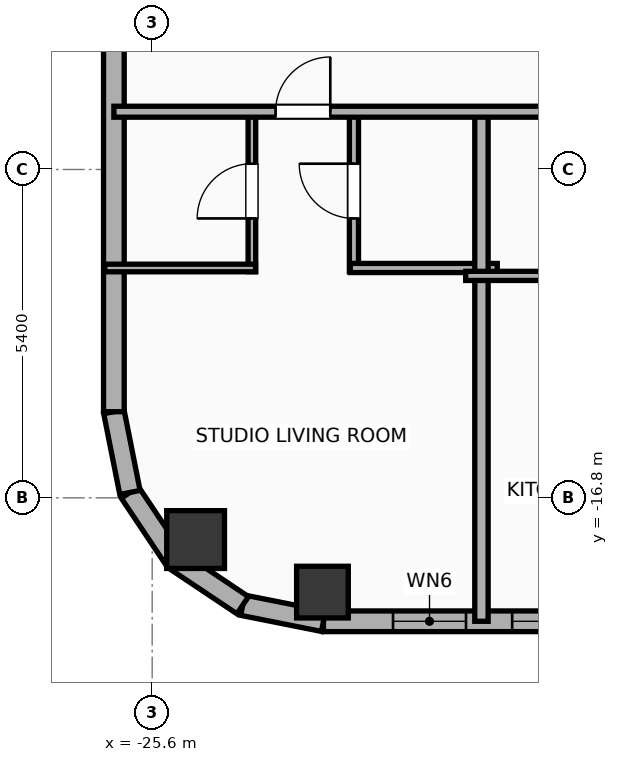
"""IFC4 building model, lengths in metres.
Left out: names, types, materials, properties, quantities, classifications, styles, units other than length and angle.
Written with IfcOpenShell. Run it as: python <this file> out.ifc"""

import sys

from ifc_helpers import new_model, si_unit, direction, frame, frame_2d, origin, origin_2d, place, context, subcontext, project, spatial, rectangle, hollow_rectangle, hollow_circle, extrude, element, fill, save


model = new_model("IFC4")
c1 = context("Model", 3, precision=1e-05, world=origin(), true_north=direction((0.0, 1.0)))
c2 = subcontext(c1, "Body", "Model", "MODEL_VIEW")
j1 = project(units=[si_unit("LENGTHUNIT", "METRE"), si_unit("PLANEANGLEUNIT", "RADIAN")], contexts=[c1])
p1 = place(None, origin())
s1 = spatial("IfcSite", under=j1, at=p1, CompositionType="ELEMENT")
p2 = place(p1, origin())
s2 = spatial("IfcBuilding", under=s1, at=p2, CompositionType="ELEMENT")
p3 = place(p2, frame((0.0, 0.0, 239.2)))
s3 = spatial("IfcBuildingStorey", under=s2, at=p3, CompositionType="ELEMENT", Elevation=239.2)
p4 = place(p3, frame((-22.8, -18.35, 0.0), z_axis=(0.0, 0.0, 1.0), x_axis=(1.0, 0.0, 0.0)))
e1 = element("IfcColumn", 1, at=p4, inside=s3, PredefinedType="COLUMN", context=c2, shape_type="SweptSolid", body=[
    extrude(hollow_rectangle(XDim=0.85, YDim=0.85, WallThickness=0.028, at=origin_2d()), origin(), (0.0, 0.0, 1.0), 3.9),
])
p5 = place(p3, frame((-24.886, -17.486, 0.0), z_axis=(0.0, 0.0, 1.0), x_axis=(1.0, 0.0, 0.0)))
e2 = element("IfcColumn", 2, at=p5, inside=s3, PredefinedType="COLUMN", context=c2, shape_type="SweptSolid", body=[
    extrude(hollow_circle(Radius=0.475, WallThickness=0.032, at=origin_2d()), origin(), (0.0, 0.0, 1.0), 3.9),
])
p6 = place(p3, frame((26.783, -18.83, 0.0), z_axis=(0.0, 0.0, 1.0), x_axis=(-1.0, 0.0, 0.0)))
e3 = element("IfcWall", 3, at=p6, inside=s3, PredefinedType="ELEMENTEDWALL", context=c2, shape_type="SweptSolid", body=[
    extrude(rectangle(XDim=49.566, YDim=0.34, at=frame_2d((24.783, 0.0))), origin(), (0.0, 0.0, 1.0), 3.65),
])
p7 = place(p6, frame((23.583, 0.0, 0.75)))
e4 = element("IfcOpeningElement", 4, at=p7, cuts=e3, PredefinedType="OPENING", context=c2, shape_type="SweptSolid", body=[
    extrude(rectangle(XDim=2.4, YDim=2.1, at=frame_2d((1.2, 1.05))), frame((0.0, 0.18, 0.0), z_axis=(0.0, -1.0, 0.0), x_axis=(1.0, 0.0, 0.0)), (0.0, 0.0, 1.0), 0.36),
])
p8 = place(p6, frame((41.756, 0.0, 0.75)))
e5 = element("IfcOpeningElement", 5, at=p8, cuts=e3, PredefinedType="OPENING", context=c2, shape_type="SweptSolid", body=[
    extrude(rectangle(XDim=2.4, YDim=2.1, at=frame_2d((1.2, 1.05))), frame((0.0, 0.18, 0.0), z_axis=(0.0, -1.0, 0.0), x_axis=(1.0, 0.0, 0.0)), (0.0, 0.0, 1.0), 0.36),
])
p9 = place(p6, frame((47.222, 0.0, 0.75)))
e6 = element("IfcOpeningElement", 6, at=p9, cuts=e3, PredefinedType="OPENING", context=c2, shape_type="SweptSolid", body=[
    extrude(rectangle(XDim=1.2, YDim=2.05, at=frame_2d((0.6, 1.025))), frame((0.0, 0.18, 0.0), z_axis=(0.0, -1.0, 0.0), x_axis=(1.0, 0.0, 0.0)), (0.0, 0.0, 1.0), 0.36),
])
p10 = place(p6, frame((45.263, 0.0, 0.75)))
e7 = element("IfcOpeningElement", 7, at=p10, cuts=e3, PredefinedType="OPENING", context=c2, shape_type="SweptSolid", body=[
    extrude(rectangle(XDim=1.2, YDim=2.05, at=frame_2d((0.6, 1.025))), frame((0.0, 0.18, 0.0), z_axis=(0.0, -1.0, 0.0), x_axis=(1.0, 0.0, 0.0)), (0.0, 0.0, 1.0), 0.36),
])
p11 = place(p6, frame((37.289, 0.0, 0.75)))
e8 = element("IfcOpeningElement", 8, at=p11, cuts=e3, PredefinedType="OPENING", context=c2, shape_type="SweptSolid", body=[
    extrude(rectangle(XDim=1.2, YDim=2.05, at=frame_2d((0.6, 1.025))), frame((0.0, 0.18, 0.0), z_axis=(0.0, -1.0, 0.0), x_axis=(1.0, 0.0, 0.0)), (0.0, 0.0, 1.0), 0.36),
])
p12 = place(p6, frame((16.115, 0.0, 0.75)))
e9 = element("IfcOpeningElement", 9, at=p12, cuts=e3, PredefinedType="OPENING", context=c2, shape_type="SweptSolid", body=[
    extrude(rectangle(XDim=1.2, YDim=2.05, at=frame_2d((0.6, 1.025))), frame((0.0, 0.18, 0.0), z_axis=(0.0, -1.0, 0.0), x_axis=(1.0, 0.0, 0.0)), (0.0, 0.0, 1.0), 0.36),
])
p13 = place(p6, frame((12.422, 0.0, 0.75)))
e10 = element("IfcOpeningElement", 10, at=p13, cuts=e3, PredefinedType="OPENING", context=c2, shape_type="SweptSolid", body=[
    extrude(rectangle(XDim=1.2, YDim=2.05, at=frame_2d((0.6, 1.025))), frame((0.0, 0.18, 0.0), z_axis=(0.0, -1.0, 0.0), x_axis=(1.0, 0.0, 0.0)), (0.0, 0.0, 1.0), 0.36),
])
p14 = place(p6, frame((8.01, 0.0, 0.75)))
e11 = element("IfcOpeningElement", 11, at=p14, cuts=e3, PredefinedType="OPENING", context=c2, shape_type="SweptSolid", body=[
    extrude(rectangle(XDim=1.2, YDim=2.05, at=frame_2d((0.6, 1.025))), frame((0.0, 0.18, 0.0), z_axis=(0.0, -1.0, 0.0), x_axis=(1.0, 0.0, 0.0)), (0.0, 0.0, 1.0), 0.36),
])
p15 = place(p6, frame((5.037, 0.0, 0.75)))
e12 = element("IfcOpeningElement", 12, at=p15, cuts=e3, PredefinedType="OPENING", context=c2, shape_type="SweptSolid", body=[
    extrude(rectangle(XDim=1.2, YDim=2.05, at=frame_2d((0.6, 1.025))), frame((0.0, 0.18, 0.0), z_axis=(0.0, -1.0, 0.0), x_axis=(1.0, 0.0, 0.0)), (0.0, 0.0, 1.0), 0.36),
])
p16 = place(p6, frame((1.811, 0.0, 0.75)))
e13 = element("IfcOpeningElement", 13, at=p16, cuts=e3, PredefinedType="OPENING", context=c2, shape_type="SweptSolid", body=[
    extrude(rectangle(XDim=1.2, YDim=2.05, at=frame_2d((0.6, 1.025))), frame((0.0, 0.18, 0.0), z_axis=(0.0, -1.0, 0.0), x_axis=(1.0, 0.0, 0.0)), (0.0, 0.0, 1.0), 0.36),
])
p17 = place(p6, frame((32.253, 0.0, 0.75)))
e14 = element("IfcOpeningElement", 14, at=p17, cuts=e3, PredefinedType="OPENING", context=c2, shape_type="SweptSolid", body=[
    extrude(rectangle(XDim=1.2, YDim=2.05, at=frame_2d((0.6, 1.025))), frame((0.0, 0.18, 0.0), z_axis=(0.0, -1.0, 0.0), x_axis=(1.0, 0.0, 0.0)), (0.0, 0.0, 1.0), 0.36),
])
p18 = place(p6, frame((27.853, 0.0, 0.75)))
e15 = element("IfcOpeningElement", 15, at=p18, cuts=e3, PredefinedType="OPENING", context=c2, shape_type="SweptSolid", body=[
    extrude(rectangle(XDim=1.2, YDim=2.05, at=frame_2d((0.6, 1.025))), frame((0.0, 0.18, 0.0), z_axis=(0.0, -1.0, 0.0), x_axis=(1.0, 0.0, 0.0)), (0.0, 0.0, 1.0), 0.36),
])
p19 = place(p6, frame((20.473, 0.0, 0.75)))
e16 = element("IfcOpeningElement", 16, at=p19, cuts=e3, PredefinedType="OPENING", context=c2, shape_type="SweptSolid", body=[
    extrude(rectangle(XDim=1.2, YDim=2.05, at=frame_2d((0.6, 1.025))), frame((0.0, 0.18, 0.0), z_axis=(0.0, -1.0, 0.0), x_axis=(1.0, 0.0, 0.0)), (0.0, 0.0, 1.0), 0.36),
])
p20 = place(p3, frame((-22.783, -18.83, 0.0), z_axis=(0.0, 0.0, 1.0), x_axis=(-0.980788153188, 0.195075878998, 0.0)))
e17 = element("IfcWall", 17, at=p20, inside=s3, PredefinedType="ELEMENTEDWALL", context=c2, shape_type="SweptSolid", body=[
    extrude(rectangle(XDim=1.354, YDim=0.34, at=frame_2d((0.677, 0.0))), origin(), (0.0, 0.0, 1.0), 3.65),
])
p21 = place(p3, frame((-24.111, -18.566, 0.0), z_axis=(0.0, 0.0, 1.0), x_axis=(-0.831403586725, 0.555669034571, 0.0)))
e18 = element("IfcWall", 18, at=p21, inside=s3, PredefinedType="ELEMENTEDWALL", context=c2, shape_type="SweptSolid", body=[
    extrude(rectangle(XDim=1.337, YDim=0.34, at=frame_2d((0.668, 0.0))), origin(), (0.0, 0.0, 1.0), 3.65),
])
p22 = place(p3, frame((-25.223, -17.823, 0.0), z_axis=(0.0, 0.0, 1.0), x_axis=(-0.555584683399, 0.831459956686, 0.0)))
e19 = element("IfcWall", 19, at=p22, inside=s3, PredefinedType="ELEMENTEDWALL", context=c2, shape_type="SweptSolid", body=[
    extrude(rectangle(XDim=1.337, YDim=0.34, at=frame_2d((0.668, 0.0))), origin(), (0.0, 0.0, 1.0), 3.65),
])
p23 = place(p3, frame((-25.966, -16.711, 0.0), z_axis=(0.0, 0.0, 1.0), x_axis=(-0.195110379894, 0.98078129043, 0.0)))
e20 = element("IfcWall", 20, at=p23, inside=s3, PredefinedType="ELEMENTEDWALL", context=c2, shape_type="SweptSolid", body=[
    extrude(rectangle(XDim=1.354, YDim=0.34, at=frame_2d((0.677, 0.0))), origin(), (0.0, 0.0, 1.0), 3.65),
])
p24 = place(p3, frame((-26.23, -15.383, 0.0), z_axis=(0.0, 0.0, 1.0), x_axis=(0.0, 1.0, 0.0)))
e21 = element("IfcWall", 21, at=p24, inside=s3, PredefinedType="ELEMENTEDWALL", context=c2, shape_type="SweptSolid", body=[
    extrude(rectangle(XDim=31.967, YDim=0.34, at=frame_2d((15.983, 0.0))), origin(), (0.0, 0.0, 1.0), 3.65),
])
p25 = place(p24, frame((29.431, 0.0, 0.75)))
e22 = element("IfcOpeningElement", 22, at=p25, cuts=e21, PredefinedType="OPENING", context=c2, shape_type="SweptSolid", body=[
    extrude(rectangle(XDim=1.2, YDim=2.05, at=frame_2d((0.6, 1.025))), frame((0.0, 0.18, 0.0), z_axis=(0.0, -1.0, 0.0), x_axis=(1.0, 0.0, 0.0)), (0.0, 0.0, 1.0), 0.36),
])
p26 = place(p24, frame((20.603, 0.0, 0.75)))
e23 = element("IfcOpeningElement", 23, at=p26, cuts=e21, PredefinedType="OPENING", context=c2, shape_type="SweptSolid", body=[
    extrude(rectangle(XDim=1.2, YDim=2.05, at=frame_2d((0.6, 1.025))), frame((0.0, 0.18, 0.0), z_axis=(0.0, -1.0, 0.0), x_axis=(1.0, 0.0, 0.0)), (0.0, 0.0, 1.0), 0.36),
])
p27 = place(p24, frame((9.778, 0.0, 0.75)))
e24 = element("IfcOpeningElement", 24, at=p27, cuts=e21, PredefinedType="OPENING", context=c2, shape_type="SweptSolid", body=[
    extrude(rectangle(XDim=1.2, YDim=2.05, at=frame_2d((0.6, 1.025))), frame((0.0, 0.18, 0.0), z_axis=(0.0, -1.0, 0.0), x_axis=(1.0, 0.0, 0.0)), (0.0, 0.0, 1.0), 0.36),
])
p28 = place(p3, frame((-23.96, -13.08, 0.0), z_axis=(0.0, 0.0, 1.0), x_axis=(0.0, 1.0, 0.0)))
e25 = element("IfcWall", 25, at=p28, inside=s3, PredefinedType="PARTITIONING", context=c2, shape_type="SweptSolid", body=[
    extrude(rectangle(XDim=2.65, YDim=0.125, at=frame_2d((1.325, 0.0))), origin(), (0.0, 0.0, 1.0), 3.65),
])
p29 = place(p28, frame((0.875, 0.0, 0.0)))
e26 = element("IfcOpeningElement", 26, at=p29, cuts=e25, PredefinedType="OPENING", context=c2, shape_type="SweptSolid", body=[
    extrude(rectangle(XDim=0.9, YDim=2.05, at=frame_2d((0.45, 1.025))), frame((0.0, 0.073, 0.0), z_axis=(0.0, -1.0, 0.0), x_axis=(1.0, 0.0, 0.0)), (0.0, 0.0, 1.0), 0.145),
])
p30 = place(p3, frame((-22.282, -13.08, 0.0), z_axis=(0.0, 0.0, 1.0), x_axis=(0.0, 1.0, 0.0)))
e27 = element("IfcWall", 27, at=p30, inside=s3, PredefinedType="PLUMBINGWALL", context=c2, shape_type="SweptSolid", body=[
    extrude(rectangle(XDim=2.65, YDim=0.15, at=frame_2d((1.325, 0.0))), origin(), (0.0, 0.0, 1.0), 3.65),
])
p31 = place(p30, frame((0.875, 0.0, 0.0)))
e28 = element("IfcOpeningElement", 28, at=p31, cuts=e27, PredefinedType="OPENING", context=c2, shape_type="SweptSolid", body=[
    extrude(rectangle(XDim=0.9, YDim=2.05, at=frame_2d((0.45, 1.025))), frame((0.0, 0.085, 0.0), z_axis=(0.0, -1.0, 0.0), x_axis=(1.0, 0.0, 0.0)), (0.0, 0.0, 1.0), 0.17),
])
p32 = place(p3, frame((-26.38, -13.02, 0.0), z_axis=(0.0, 0.0, 1.0), x_axis=(1.0, 0.0, 0.0)))
e29 = element("IfcWall", 29, at=p32, inside=s3, PredefinedType="PARTITIONING", context=c2, shape_type="SweptSolid", body=[
    extrude(rectangle(XDim=2.48, YDim=0.125, at=frame_2d((1.24, 0.0))), origin(), (0.0, 0.0, 1.0), 3.65),
])
p33 = place(p3, frame((-22.342, -13.02, 0.0), z_axis=(0.0, 0.0, 1.0), x_axis=(1.0, 0.0, 0.0)))
e30 = element("IfcWall", 30, at=p33, inside=s3, PredefinedType="PLUMBINGWALL", context=c2, shape_type="SweptSolid", body=[
    extrude(rectangle(XDim=2.417, YDim=0.15, at=frame_2d((1.208, 0.0))), origin(), (0.0, 0.0, 1.0), 3.65),
])
p34 = place(p3, frame((-20.185, -18.83, 0.0), z_axis=(0.0, 0.0, 1.0), x_axis=(0.0, 1.0, 0.0)))
e31 = element("IfcWall", 31, at=p34, inside=s3, PredefinedType="PARTITIONING", context=c2, shape_type="SweptSolid", body=[
    extrude(rectangle(XDim=8.46, YDim=0.22, at=frame_2d((4.23, 0.0))), origin(), (0.0, 0.0, 1.0), 3.09),
])
p35 = place(p3, frame((-20.445, -13.15, 0.0), z_axis=(0.0, 0.0, 1.0), x_axis=(1.0, 0.0, 0.0)))
e32 = element("IfcWall", 32, at=p35, inside=s3, PredefinedType="PLUMBINGWALL", context=c2, shape_type="SweptSolid", body=[
    extrude(rectangle(XDim=2.55, YDim=0.15, at=frame_2d((1.275, 0.0))), origin(), (0.0, 0.0, 1.0), 3.65),
])
p36 = place(p3, frame((-26.23, -10.45, 0.0), z_axis=(0.0, 0.0, 1.0), x_axis=(1.0, 0.0, 0.0)))
e33 = element("IfcWall", 33, at=p36, inside=s3, PredefinedType="PARTITIONING", context=c2, shape_type="SweptSolid", body=[
    extrude(rectangle(XDim=18.15, YDim=0.18, at=frame_2d((9.075, 0.0))), origin(), (0.0, 0.0, 1.0), 3.65),
])
p37 = place(p36, frame((2.659, 0.0, 0.0)))
e34 = element("IfcOpeningElement", 34, at=p37, cuts=e33, PredefinedType="OPENING", context=c2, shape_type="SweptSolid", body=[
    extrude(rectangle(XDim=0.9, YDim=2.05, at=frame_2d((0.45, 1.025))), frame((0.0, 0.1, 0.0), z_axis=(0.0, -1.0, 0.0), x_axis=(1.0, 0.0, 0.0)), (0.0, 0.0, 1.0), 0.2),
])
p38 = place(p36, frame((9.571, 0.0, 0.0)))
e35 = element("IfcOpeningElement", 35, at=p38, cuts=e33, PredefinedType="OPENING", context=c2, shape_type="SweptSolid", body=[
    extrude(rectangle(XDim=1.15, YDim=2.05, at=frame_2d((0.575, 1.025))), frame((0.0, 0.1, 0.0), z_axis=(0.0, -1.0, 0.0), x_axis=(1.0, 0.0, 0.0)), (0.0, 0.0, 1.0), 0.2),
])
p39 = place(p36, frame((14.792, 0.0, 0.0)))
e36 = element("IfcOpeningElement", 36, at=p39, cuts=e33, PredefinedType="OPENING", context=c2, shape_type="SweptSolid", body=[
    extrude(rectangle(XDim=0.9, YDim=2.05, at=frame_2d((0.45, 1.025))), frame((0.0, 0.1, 0.0), z_axis=(0.0, -1.0, 0.0), x_axis=(1.0, 0.0, 0.0)), (0.0, 0.0, 1.0), 0.2),
])
p40 = place(p9, origin())
e37 = element("IfcWindow", 37, at=p40, inside=s3, PartitioningType="SINGLE_PANEL", PredefinedType="WINDOW", context=c2, shape_type="SweptSolid", body=[
    extrude(rectangle(XDim=1.2, YDim=2.05, at=frame_2d((0.6, 1.025))), frame((0.0, 0.03, 0.0), z_axis=(0.0, -1.0, 0.0), x_axis=(1.0, 0.0, 0.0)), (0.0, 0.0, 1.0), 0.06),
])
fill(e6, e37)
p41 = place(p10, origin())
e38 = element("IfcWindow", 38, at=p41, inside=s3, PartitioningType="SINGLE_PANEL", PredefinedType="WINDOW", context=c2, shape_type="SweptSolid", body=[
    extrude(rectangle(XDim=1.2, YDim=2.05, at=frame_2d((0.6, 1.025))), frame((0.0, 0.03, 0.0), z_axis=(0.0, -1.0, 0.0), x_axis=(1.0, 0.0, 0.0)), (0.0, 0.0, 1.0), 0.06),
])
fill(e7, e38)
p42 = place(p29, origin())
e39 = element("IfcDoor", 39, at=p42, inside=s3, OperationType="SINGLE_SWING_LEFT", PredefinedType="DOOR", context=c2, shape_type="SweptSolid", body=[
    extrude(rectangle(XDim=0.9, YDim=2.05, at=frame_2d((0.45, 1.025))), frame((0.0, 0.025, 0.0), z_axis=(0.0, -1.0, 0.0), x_axis=(1.0, 0.0, 0.0)), (0.0, 0.0, 1.0), 0.05),
])
fill(e26, e39)
p43 = place(p31, origin())
e40 = element("IfcDoor", 40, at=p43, inside=s3, OperationType="SINGLE_SWING_RIGHT", PredefinedType="DOOR", context=c2, shape_type="SweptSolid", body=[
    extrude(rectangle(XDim=0.9, YDim=2.05, at=frame_2d((0.45, 1.025))), frame((0.0, 0.025, 0.0), z_axis=(0.0, -1.0, 0.0), x_axis=(1.0, 0.0, 0.0)), (0.0, 0.0, 1.0), 0.05),
])
fill(e28, e40)
p44 = place(p37, origin())
e41 = element("IfcDoor", 41, at=p44, inside=s3, OperationType="SINGLE_SWING_RIGHT", PredefinedType="DOOR", context=c2, shape_type="SweptSolid", body=[
    extrude(rectangle(XDim=0.9, YDim=2.05, at=frame_2d((0.45, 1.025))), frame((0.0, 0.025, 0.0), z_axis=(0.0, -1.0, 0.0), x_axis=(1.0, 0.0, 0.0)), (0.0, 0.0, 1.0), 0.05),
])
fill(e34, e41)
save(model, sys.argv[1])
